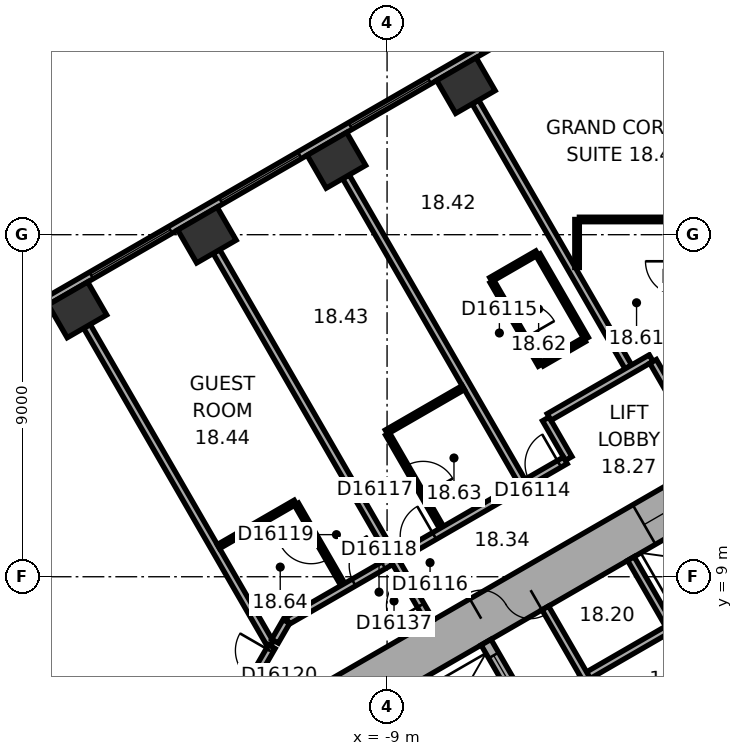
"""IFC4 building model, lengths in metres.
Left out: names, types, materials, properties, quantities, classifications, styles, units other than length and angle.
Written with IfcOpenShell. Run it as: python <this file> out.ifc"""

import sys

from ifc_helpers import new_model, si_unit, direction, frame, frame_2d, origin, origin_2d, place, context, subcontext, project, spatial, rectangle, extrude, element, fill, save


model = new_model("IFC4")
c1 = context("Model", 3, precision=1e-05, world=origin(), true_north=direction((0.0, 1.0)))
c2 = subcontext(c1, "Body", "Model", "MODEL_VIEW")
j1 = project(units=[si_unit("LENGTHUNIT", "METRE"), si_unit("PLANEANGLEUNIT", "RADIAN")], contexts=[c1])
p1 = place(None, origin())
s1 = spatial("IfcSite", under=j1, at=p1, CompositionType="ELEMENT")
p2 = place(p1, origin())
s2 = spatial("IfcBuilding", under=s1, at=p2, CompositionType="ELEMENT")
p3 = place(p2, frame((0.0, 0.0, 83.6)))
s3 = spatial("IfcBuildingStorey", under=s2, at=p3, CompositionType="ELEMENT", Elevation=83.6)
for number, where, z_axis, x_axis in (
    (1, (-6.926, 21.925, 0.0), (0.0, 0.0, 1.0), (-0.866, -0.5, 0.0)),
    (2, (-10.333, 19.957, 0.0), (0.0, 0.0, 1.0), (-0.866, -0.5, 0.0)),
    (3, (-13.74, 17.99, 0.0), (0.0, 0.0, 1.0), (-0.866, -0.5, 0.0)),
    (4, (-17.148, 16.023, 0.0), (0.0, 0.0, 1.0), (-0.866, -0.5, 0.0)),
):
    element("IfcColumn", number, at=place(p3, frame(where, z_axis=z_axis, x_axis=x_axis)), inside=s3, PredefinedType="COLUMN", context=c2, shape_type="SweptSolid", body=[
        extrude(rectangle(XDim=1.2, YDim=1.0, at=origin_2d()), origin(), (0.0, 0.0, 1.0), 3.3),
    ])
p4 = place(p3, frame((0.3, 11.836, 0.0), z_axis=(0.0, 0.0, 1.0), x_axis=(-0.866021384402, -0.500006961711, 0.0)))
e5 = element("IfcWall", 5, at=p4, inside=s3, PredefinedType="SHEAR", context=c2, shape_type="SweptSolid", body=[
    extrude(rectangle(XDim=12.355, YDim=1.2, at=frame_2d((6.178, 0.0))), origin(), (0.0, 0.0, 1.0), 3.3),
])
p5 = place(p4, frame((6.378, 0.0, 0.0)))
e6 = element("IfcOpeningElement", 6, at=p5, cuts=e5, PredefinedType="OPENING", context=c2, shape_type="SweptSolid", body=[
    extrude(rectangle(XDim=1.5, YDim=2.1, at=frame_2d((0.75, 1.05))), frame((0.0, 0.61, 0.0), z_axis=(0.0, -1.0, 0.0), x_axis=(1.0, 0.0, 0.0)), (0.0, 0.0, 1.0), 1.22),
])
p6 = place(p4, frame((1.828, 0.0, 0.0)))
e7 = element("IfcOpeningElement", 7, at=p6, cuts=e5, PredefinedType="OPENING", context=c2, shape_type="SweptSolid", body=[
    extrude(rectangle(XDim=1.1, YDim=2.1, at=frame_2d((0.55, 1.05))), frame((0.0, 0.61, 0.0), z_axis=(0.0, -1.0, 0.0), x_axis=(1.0, 0.0, 0.0)), (0.0, 0.0, 1.0), 1.22),
])
p7 = place(p3, frame((-3.136, 24.805, 0.0), z_axis=(0.0, 0.0, 1.0), x_axis=(-0.866028291626, -0.499994998079, 0.0)))
e8 = element("IfcWall", 8, at=p7, inside=s3, PredefinedType="STANDARD", context=c2, shape_type="SweptSolid", body=[
    extrude(rectangle(XDim=21.246, YDim=0.2, at=frame_2d((10.623, 0.0))), origin(), (0.0, 0.0, 1.0), 3.3),
])
p8 = place(p7, frame((1.555, 0.0, 0.8)))
e9 = element("IfcOpeningElement", 9, at=p8, cuts=e8, PredefinedType="OPENING", context=c2, shape_type="SweptSolid", body=[
    extrude(rectangle(XDim=2.4, YDim=1.7, at=frame_2d((1.2, 0.85))), frame((0.0, 0.11, 0.0), z_axis=(0.0, -1.0, 0.0), x_axis=(1.0, 0.0, 0.0)), (0.0, 0.0, 1.0), 0.22),
])
p9 = place(p7, frame((5.489, 0.0, 0.8)))
e10 = element("IfcOpeningElement", 10, at=p9, cuts=e8, PredefinedType="OPENING", context=c2, shape_type="SweptSolid", body=[
    extrude(rectangle(XDim=2.4, YDim=1.7, at=frame_2d((1.2, 0.85))), frame((0.0, 0.11, 0.0), z_axis=(0.0, -1.0, 0.0), x_axis=(1.0, 0.0, 0.0)), (0.0, 0.0, 1.0), 0.22),
])
p10 = place(p7, frame((9.424, 0.0, 0.8)))
e11 = element("IfcOpeningElement", 11, at=p10, cuts=e8, PredefinedType="OPENING", context=c2, shape_type="SweptSolid", body=[
    extrude(rectangle(XDim=2.4, YDim=1.7, at=frame_2d((1.2, 0.85))), frame((0.0, 0.11, 0.0), z_axis=(0.0, -1.0, 0.0), x_axis=(1.0, 0.0, 0.0)), (0.0, 0.0, 1.0), 0.22),
])
p11 = place(p7, frame((13.358, 0.0, 0.8)))
e12 = element("IfcOpeningElement", 12, at=p11, cuts=e8, PredefinedType="OPENING", context=c2, shape_type="SweptSolid", body=[
    extrude(rectangle(XDim=2.4, YDim=1.7, at=frame_2d((1.2, 0.85))), frame((0.0, 0.11, 0.0), z_axis=(0.0, -1.0, 0.0), x_axis=(1.0, 0.0, 0.0)), (0.0, 0.0, 1.0), 0.22),
])
p12 = place(p7, frame((17.293, 0.0, 0.8)))
e13 = element("IfcOpeningElement", 13, at=p12, cuts=e8, PredefinedType="OPENING", context=c2, shape_type="SweptSolid", body=[
    extrude(rectangle(XDim=2.4, YDim=1.7, at=frame_2d((1.2, 0.85))), frame((0.0, 0.11, 0.0), z_axis=(0.0, -1.0, 0.0), x_axis=(1.0, 0.0, 0.0)), (0.0, 0.0, 1.0), 0.22),
])
p13 = place(p3, frame((0.803, 9.009, 0.0), z_axis=(0.0, 0.0, 1.0), x_axis=(-0.866028230842, -0.499995103361, 0.0)))
e14 = element("IfcWall", 14, at=p13, inside=s3, PredefinedType="PARTITIONING", context=c2, shape_type="SweptSolid", body=[
    extrude(rectangle(XDim=5.4, YDim=0.2, at=frame_2d((2.7, 0.0))), origin(), (0.0, 0.0, 1.0), 3.05),
])
for number, where, z_axis, x_axis in (
    (15, (-1.485, 7.572, 0.0), (0.0, 0.0, 1.0), (-0.5, 0.866, 0.0)),
    (16, (-3.737, 6.272, 0.0), (0.0, 0.0, 1.0), (-0.5, 0.866, 0.0)),
):
    element("IfcWall", number, at=place(p3, frame(where, z_axis=z_axis, x_axis=x_axis)), inside=s3, PredefinedType="PARTITIONING", context=c2, shape_type="SweptSolid", body=[
        extrude(rectangle(XDim=2.2, YDim=0.2, at=frame_2d((1.1, 0.0))), origin(), (0.0, 0.0, 1.0), 3.05),
    ])
p14 = place(p3, frame((-2.216, 4.282, 0.0), z_axis=(0.0, 0.0, 1.0), x_axis=(0.499977259774, 0.866038532462, 0.0)))
e17 = element("IfcWall", 17, at=p14, inside=s3, PredefinedType="SHEAR", context=c2, shape_type="SweptSolid", body=[
    extrude(rectangle(XDim=4.7, YDim=0.3, at=frame_2d((2.35, 0.0))), origin(), (0.0, 0.0, 1.0), 3.05),
])
p15 = place(p3, frame((-5.295, 5.372, 0.0), z_axis=(0.0, 0.0, 1.0), x_axis=(-0.500077893725, 0.86598042715, 0.0)))
e18 = element("IfcWall", 18, at=p15, inside=s3, PredefinedType="SHEAR", context=c2, shape_type="SweptSolid", body=[
    extrude(rectangle(XDim=2.2, YDim=0.3, at=frame_2d((1.1, 0.0))), origin(), (0.0, 0.0, 1.0), 3.05),
])
p16 = place(p15, frame((0.7, 0.0, 0.0)))
e19 = element("IfcOpeningElement", 19, at=p16, cuts=e18, PredefinedType="OPENING", context=c2, shape_type="SweptSolid", body=[
    extrude(rectangle(XDim=1.1, YDim=2.1, at=frame_2d((0.55, 1.05))), frame((0.0, 0.16, 0.0), z_axis=(0.0, -1.0, 0.0), x_axis=(1.0, 0.0, 0.0)), (0.0, 0.0, 1.0), 0.32),
])
p17 = place(p3, frame((-16.898, 15.59, 0.0), z_axis=(0.0, 0.0, 1.0), x_axis=(0.499994742786, -0.866028439017, 0.0)))
e20 = element("IfcWall", 20, at=p17, inside=s3, PredefinedType="PARTITIONING", context=c2, shape_type="SweptSolid", body=[
    extrude(rectangle(XDim=9.65, YDim=0.2, at=frame_2d((4.825, 0.0))), origin(), (0.0, 0.0, 1.0), 3.05),
])
p18 = place(p3, frame((-13.436, 9.794, 0.0), z_axis=(0.0, 0.0, 1.0), x_axis=(0.866053246676, 0.499951771596, 0.0)))
e21 = element("IfcWall", 21, at=p18, inside=s3, PredefinedType="PARTITIONING", context=c2, shape_type="SweptSolid", body=[
    extrude(rectangle(XDim=2.335, YDim=0.12, at=frame_2d((1.167, 0.0))), origin(), (0.0, 0.0, 1.0), 3.05),
])
p19 = place(p3, frame((-12.032, 7.162, 0.0), z_axis=(0.0, 0.0, 1.0), x_axis=(-0.499951829968, -0.866053212979, 0.0)))
e22 = element("IfcWall", 22, at=p19, inside=s3, PredefinedType="PARTITIONING", context=c2, shape_type="SweptSolid", body=[
    extrude(rectangle(XDim=1.136, YDim=0.2, at=frame_2d((0.568, 0.0))), origin(), (0.0, 0.0, 1.0), 3.05),
])
p20 = place(p19, frame((0.118, 0.0, 0.0)))
e23 = element("IfcOpeningElement", 23, at=p20, cuts=e22, PredefinedType="OPENING", context=c2, shape_type="SweptSolid", body=[
    extrude(rectangle(XDim=0.9, YDim=2.1, at=frame_2d((0.45, 1.05))), frame((0.0, 0.11, 0.0), z_axis=(0.0, -1.0, 0.0), x_axis=(1.0, 0.0, 0.0)), (0.0, 0.0, 1.0), 0.22),
])
p21 = place(p3, frame((-11.65, 7.823, 0.0), z_axis=(0.0, 0.0, 1.0), x_axis=(-0.50012165622, -0.865955154139, 0.0)))
e24 = element("IfcWall", 24, at=p21, inside=s3, PredefinedType="PARTITIONING", context=c2, shape_type="SweptSolid", body=[
    extrude(rectangle(XDim=0.6, YDim=0.2, at=frame_2d((0.3, 0.0))), origin(), (0.0, 0.0, 1.0), 3.05),
])
p22 = place(p3, frame((-11.385, 10.909, 0.0), z_axis=(0.0, 0.0, 1.0), x_axis=(0.500077547548, -0.865980627057, 0.0)))
e25 = element("IfcWall", 25, at=p22, inside=s3, PredefinedType="PARTITIONING", context=c2, shape_type="SweptSolid", body=[
    extrude(rectangle(XDim=2.44, YDim=0.12, at=frame_2d((1.22, 0.0))), origin(), (0.0, 0.0, 1.0), 3.05),
])
p23 = place(p22, frame((0.77, 0.0, 0.0)))
e26 = element("IfcOpeningElement", 26, at=p23, cuts=e25, PredefinedType="OPENING", context=c2, shape_type="SweptSolid", body=[
    extrude(rectangle(XDim=0.9, YDim=2.1, at=frame_2d((0.45, 1.05))), frame((0.0, 0.07, 0.0), z_axis=(0.0, -1.0, 0.0), x_axis=(1.0, 0.0, 0.0)), (0.0, 0.0, 1.0), 0.14),
])
p24 = place(p3, frame((-10.083, 19.524, 0.0), z_axis=(0.0, 0.0, 1.0), x_axis=(0.499999662836, -0.866025598446, 0.0)))
e27 = element("IfcWall", 27, at=p24, inside=s3, PredefinedType="PARTITIONING", context=c2, shape_type="SweptSolid", body=[
    extrude(rectangle(XDim=9.25, YDim=0.2, at=frame_2d((4.625, 0.0))), origin(), (0.0, 0.0, 1.0), 2.6),
])
p25 = place(p3, frame((-9.016, 12.808, 0.0), z_axis=(0.0, 0.0, 1.0), x_axis=(0.86600796803, 0.500030198396, 0.0)))
e28 = element("IfcWall", 28, at=p25, inside=s3, PredefinedType="PARTITIONING", context=c2, shape_type="SweptSolid", body=[
    extrude(rectangle(XDim=2.335, YDim=0.12, at=frame_2d((1.167, 0.0))), origin(), (0.0, 0.0, 1.0), 3.05),
])
p26 = place(p3, frame((-8.902, 9.41, 0.0), z_axis=(0.0, 0.0, 1.0), x_axis=(-0.866014299198, -0.500019233215, 0.0)))
e29 = element("IfcWall", 29, at=p26, inside=s3, PredefinedType="PARTITIONING", context=c2, shape_type="SweptSolid", body=[
    extrude(rectangle(XDim=3.133, YDim=0.2, at=frame_2d((1.567, 0.0))), origin(), (0.0, 0.0, 1.0), 3.05),
])
p27 = place(p26, frame((0.225, 0.0, 0.0)))
e30 = element("IfcOpeningElement", 30, at=p27, cuts=e29, PredefinedType="OPENING", context=c2, shape_type="SweptSolid", body=[
    extrude(rectangle(XDim=0.9, YDim=2.1, at=frame_2d((0.45, 1.05))), frame((0.0, 0.11, 0.0), z_axis=(0.0, -1.0, 0.0), x_axis=(1.0, 0.0, 0.0)), (0.0, 0.0, 1.0), 0.22),
])
p28 = place(p3, frame((-7.865, 7.814, 0.0), z_axis=(0.0, 0.0, 1.0), x_axis=(-0.500004234368, 0.866022959057, 0.0)))
e31 = element("IfcWall", 31, at=p28, inside=s3, PredefinedType="PARTITIONING", context=c2, shape_type="SweptSolid", body=[
    extrude(rectangle(XDim=11.25, YDim=0.2, at=frame_2d((5.625, 0.0))), origin(), (0.0, 0.0, 1.0), 3.05),
])
p29 = place(p28, frame((0.5, 0.0, 0.0)))
e32 = element("IfcOpeningElement", 32, at=p29, cuts=e31, PredefinedType="OPENING", context=c2, shape_type="SweptSolid", body=[
    extrude(rectangle(XDim=0.9, YDim=2.1, at=frame_2d((0.45, 1.05))), frame((0.0, 0.11, 0.0), z_axis=(0.0, -1.0, 0.0), x_axis=(1.0, 0.0, 0.0)), (0.0, 0.0, 1.0), 0.22),
])
p30 = place(p3, frame((-7.566, 10.296, 0.0), z_axis=(0.0, 0.0, 1.0), x_axis=(-0.499985389037, 0.866033839264, 0.0)))
e33 = element("IfcWall", 33, at=p30, inside=s3, PredefinedType="PARTITIONING", context=c2, shape_type="SweptSolid", body=[
    extrude(rectangle(XDim=2.84, YDim=0.12, at=frame_2d((1.42, 0.0))), origin(), (0.0, 0.0, 1.0), 3.05),
])
p31 = place(p30, frame((0.97, 0.0, 0.0)))
e34 = element("IfcOpeningElement", 34, at=p31, cuts=e33, PredefinedType="OPENING", context=c2, shape_type="SweptSolid", body=[
    extrude(rectangle(XDim=0.9, YDim=2.1, at=frame_2d((0.45, 1.05))), frame((0.0, 0.07, 0.0), z_axis=(0.0, -1.0, 0.0), x_axis=(1.0, 0.0, 0.0)), (0.0, 0.0, 1.0), 0.14),
])
p32 = place(p3, frame((-6.676, 21.492, 0.0), z_axis=(0.0, 0.0, 1.0), x_axis=(0.500011263043, -0.866018900966, 0.0)))
e35 = element("IfcWall", 35, at=p32, inside=s3, PredefinedType="PARTITIONING", context=c2, shape_type="SweptSolid", body=[
    extrude(rectangle(XDim=8.049, YDim=0.2, at=frame_2d((4.024, 0.0))), origin(), (0.0, 0.0, 1.0), 3.05),
])
p33 = place(p3, frame((-6.268, 16.82, 0.0), z_axis=(0.0, 0.0, 1.0), x_axis=(0.866002662425, 0.500039387122, 0.0)))
e36 = element("IfcWall", 36, at=p33, inside=s3, PredefinedType="PARTITIONING", context=c2, shape_type="SweptSolid", body=[
    extrude(rectangle(XDim=1.4, YDim=0.12, at=frame_2d((0.7, 0.0))), origin(), (0.0, 0.0, 1.0), 3.05),
])
p34 = place(p3, frame((-5.026, 17.469, 0.0), z_axis=(0.0, 0.0, 1.0), x_axis=(0.500005339912, -0.866022320763, 0.0)))
e37 = element("IfcWall", 37, at=p34, inside=s3, PredefinedType="PARTITIONING", context=c2, shape_type="SweptSolid", body=[
    extrude(rectangle(XDim=2.54, YDim=0.12, at=frame_2d((1.27, 0.0))), origin(), (0.0, 0.0, 1.0), 3.05),
])
p35 = place(p3, frame((-4.968, 14.569, 0.0), z_axis=(0.0, 0.0, 1.0), x_axis=(-0.500046963369, 0.865998287773, 0.0)))
e38 = element("IfcWall", 38, at=p35, inside=s3, PredefinedType="PARTITIONING", context=c2, shape_type="SweptSolid", body=[
    extrude(rectangle(XDim=2.54, YDim=0.12, at=frame_2d((1.27, 0.0))), origin(), (0.0, 0.0, 1.0), 3.05),
])
p36 = place(p35, frame((0.82, 0.0, 0.0)))
e39 = element("IfcOpeningElement", 39, at=p36, cuts=e38, PredefinedType="OPENING", context=c2, shape_type="SweptSolid", body=[
    extrude(rectangle(XDim=0.9, YDim=2.1, at=frame_2d((0.45, 1.05))), frame((0.0, 0.07, 0.0), z_axis=(0.0, -1.0, 0.0), x_axis=(1.0, 0.0, 0.0)), (0.0, 0.0, 1.0), 0.14),
])
p37 = place(p3, frame((-4.823, 13.152, 0.0), z_axis=(0.0, 0.0, 1.0), x_axis=(0.499986357472, -0.866033280158, 0.0)))
e40 = element("IfcWall", 40, at=p37, inside=s3, PredefinedType="PARTITIONING", context=c2, shape_type="SweptSolid", body=[
    extrude(rectangle(XDim=1.201, YDim=0.2, at=frame_2d((0.601, 0.0))), origin(), (0.0, 0.0, 1.0), 3.05),
])
p38 = place(p3, frame((-4.309, 12.061, 0.0), z_axis=(0.0, 0.0, 1.0), x_axis=(-0.866020679205, -0.500008183122, 0.0)))
e41 = element("IfcWall", 41, at=p38, inside=s3, PredefinedType="PARTITIONING", context=c2, shape_type="SweptSolid", body=[
    extrude(rectangle(XDim=5.104, YDim=0.2, at=frame_2d((2.552, 0.0))), origin(), (0.0, 0.0, 1.0), 3.05),
])
p39 = place(p38, frame((0.185, 0.0, 0.0)))
e42 = element("IfcOpeningElement", 42, at=p39, cuts=e41, PredefinedType="OPENING", context=c2, shape_type="SweptSolid", body=[
    extrude(rectangle(XDim=0.9, YDim=2.1, at=frame_2d((0.45, 1.05))), frame((0.0, 0.11, 0.0), z_axis=(0.0, -1.0, 0.0), x_axis=(1.0, 0.0, 0.0)), (0.0, 0.0, 1.0), 0.22),
])
p40 = place(p38, frame((3.979, 0.0, 0.0)))
e43 = element("IfcOpeningElement", 43, at=p40, cuts=e41, PredefinedType="OPENING", context=c2, shape_type="SweptSolid", body=[
    extrude(rectangle(XDim=0.9, YDim=2.1, at=frame_2d((0.45, 1.05))), frame((0.0, 0.11, 0.0), z_axis=(0.0, -1.0, 0.0), x_axis=(1.0, 0.0, 0.0)), (0.0, 0.0, 1.0), 0.22),
])
p41 = place(p3, frame((-4.0, 17.137, 0.0), z_axis=(0.0, 0.0, 1.0), x_axis=(0.0, 1.0, 0.0)))
e44 = element("IfcWall", 44, at=p41, inside=s3, PredefinedType="PARTITIONING", context=c2, shape_type="SweptSolid", body=[
    extrude(rectangle(XDim=1.263, YDim=0.12, at=frame_2d((0.632, 0.0))), origin(), (0.0, 0.0, 1.0), 3.05),
])
p42 = place(p3, frame((-3.94, 18.401, 0.0), z_axis=(0.0, 0.0, 1.0), x_axis=(1.0, 0.0, 0.0)))
e45 = element("IfcWall", 45, at=p42, inside=s3, PredefinedType="PARTITIONING", context=c2, shape_type="SweptSolid", body=[
    extrude(rectangle(XDim=2.64, YDim=0.12, at=frame_2d((1.32, 0.0))), origin(), (0.0, 0.0, 1.0), 3.05),
])
p43 = place(p3, frame((-3.808, 15.239, 0.0), z_axis=(0.0, 0.0, 1.0), x_axis=(-0.866087136806, -0.499893060024, 0.0)))
e46 = element("IfcWall", 46, at=p43, inside=s3, PredefinedType="PARTITIONING", context=c2, shape_type="SweptSolid", body=[
    extrude(rectangle(XDim=1.28, YDim=0.12, at=frame_2d((0.64, 0.0))), origin(), (0.0, 0.0, 1.0), 3.05),
])
p44 = place(p3, frame((-2.05, 14.752, 0.0), z_axis=(0.0, 0.0, 1.0), x_axis=(-0.866030936828, -0.499990416364, 0.0)))
e47 = element("IfcWall", 47, at=p44, inside=s3, PredefinedType="PARTITIONING", context=c2, shape_type="SweptSolid", body=[
    extrude(rectangle(XDim=3.102, YDim=0.2, at=frame_2d((1.551, 0.0))), origin(), (0.0, 0.0, 1.0), 3.05),
])
p45 = place(p3, frame((-1.449, 13.712, 0.0), z_axis=(0.0, 0.0, 1.0), x_axis=(-0.499978356969, 0.866037899034, 0.0)))
e48 = element("IfcWall", 48, at=p45, inside=s3, PredefinedType="PARTITIONING", context=c2, shape_type="SweptSolid", body=[
    extrude(rectangle(XDim=1.101, YDim=0.2, at=frame_2d((0.551, 0.0))), origin(), (0.0, 0.0, 1.0), 3.05),
])
p46 = place(p3, frame((-1.3, 15.301, 0.0), z_axis=(0.0, 0.0, 1.0), x_axis=(-1.0, 0.0, 0.0)))
e49 = element("IfcWall", 49, at=p46, inside=s3, PredefinedType="PARTITIONING", context=c2, shape_type="SweptSolid", body=[
    extrude(rectangle(XDim=1.661, YDim=0.12, at=frame_2d((0.831, 0.0))), origin(), (0.0, 0.0, 1.0), 3.05),
])
p47 = place(p9, origin())
e50 = element("IfcWindow", 50, at=p47, inside=s3, PartitioningType="SINGLE_PANEL", PredefinedType="WINDOW", context=c2, shape_type="SweptSolid", body=[
    extrude(rectangle(XDim=2.4, YDim=1.7, at=frame_2d((1.2, 0.85))), frame((0.0, 0.03, 0.0), z_axis=(0.0, -1.0, 0.0), x_axis=(1.0, 0.0, 0.0)), (0.0, 0.0, 1.0), 0.06),
])
fill(e10, e50)
p48 = place(p10, origin())
e51 = element("IfcWindow", 51, at=p48, inside=s3, PartitioningType="SINGLE_PANEL", PredefinedType="WINDOW", context=c2, shape_type="SweptSolid", body=[
    extrude(rectangle(XDim=2.4, YDim=1.7, at=frame_2d((1.2, 0.85))), frame((0.0, 0.03, 0.0), z_axis=(0.0, -1.0, 0.0), x_axis=(1.0, 0.0, 0.0)), (0.0, 0.0, 1.0), 0.06),
])
fill(e11, e51)
p49 = place(p11, origin())
e52 = element("IfcWindow", 52, at=p49, inside=s3, PartitioningType="SINGLE_PANEL", PredefinedType="WINDOW", context=c2, shape_type="SweptSolid", body=[
    extrude(rectangle(XDim=2.4, YDim=1.7, at=frame_2d((1.2, 0.85))), frame((0.0, 0.03, 0.0), z_axis=(0.0, -1.0, 0.0), x_axis=(1.0, 0.0, 0.0)), (0.0, 0.0, 1.0), 0.06),
])
fill(e12, e52)
p50 = place(p5, origin())
e53 = element("IfcDoor", 53, at=p50, inside=s3, OperationType="DOUBLE_DOOR_SINGLE_SWING", PredefinedType="DOOR", context=c2, shape_type="SweptSolid", body=[
    extrude(rectangle(XDim=1.5, YDim=2.1, at=frame_2d((0.75, 1.05))), frame((0.0, 0.025, 0.0), z_axis=(0.0, -1.0, 0.0), x_axis=(1.0, 0.0, 0.0)), (0.0, 0.0, 1.0), 0.05),
])
fill(e6, e53)
p51 = place(p16, origin())
e54 = element("IfcDoor", 54, at=p51, inside=s3, OperationType="DOUBLE_DOOR_SLIDING", PredefinedType="DOOR", context=c2, shape_type="SweptSolid", body=[
    extrude(rectangle(XDim=1.1, YDim=2.1, at=frame_2d((0.55, 1.05))), frame((0.0, 0.025, 0.0), z_axis=(0.0, -1.0, 0.0), x_axis=(1.0, 0.0, 0.0)), (0.0, 0.0, 1.0), 0.05),
])
fill(e19, e54)
p52 = place(p6, origin())
e55 = element("IfcDoor", 55, at=p52, inside=s3, OperationType="DOUBLE_DOOR_SLIDING", PredefinedType="DOOR", context=c2, shape_type="SweptSolid", body=[
    extrude(rectangle(XDim=1.1, YDim=2.1, at=frame_2d((0.55, 1.05))), frame((0.0, 0.025, 0.0), z_axis=(0.0, -1.0, 0.0), x_axis=(1.0, 0.0, 0.0)), (0.0, 0.0, 1.0), 0.05),
])
fill(e7, e55)
p53 = place(p39, origin())
e56 = element("IfcDoor", 56, at=p53, inside=s3, OperationType="SINGLE_SWING_LEFT", PredefinedType="DOOR", context=c2, shape_type="SweptSolid", body=[
    extrude(rectangle(XDim=0.9, YDim=2.1, at=frame_2d((0.45, 1.05))), frame((0.0, 0.025, 0.0), z_axis=(0.0, -1.0, 0.0), x_axis=(1.0, 0.0, 0.0)), (0.0, 0.0, 1.0), 0.05),
])
fill(e42, e56)
p54 = place(p36, origin())
e57 = element("IfcDoor", 57, at=p54, inside=s3, OperationType="SINGLE_SWING_LEFT", PredefinedType="DOOR", context=c2, shape_type="SweptSolid", body=[
    extrude(rectangle(XDim=0.9, YDim=2.1, at=frame_2d((0.45, 1.05))), frame((0.0, 0.025, 0.0), z_axis=(0.0, -1.0, 0.0), x_axis=(1.0, 0.0, 0.0)), (0.0, 0.0, 1.0), 0.05),
])
fill(e39, e57)
p55 = place(p40, origin())
e58 = element("IfcDoor", 58, at=p55, inside=s3, OperationType="SINGLE_SWING_LEFT", PredefinedType="DOOR", context=c2, shape_type="SweptSolid", body=[
    extrude(rectangle(XDim=0.9, YDim=2.1, at=frame_2d((0.45, 1.05))), frame((0.0, 0.025, 0.0), z_axis=(0.0, -1.0, 0.0), x_axis=(1.0, 0.0, 0.0)), (0.0, 0.0, 1.0), 0.05),
])
fill(e43, e58)
p56 = place(p31, origin())
e59 = element("IfcDoor", 59, at=p56, inside=s3, OperationType="SINGLE_SWING_LEFT", PredefinedType="DOOR", context=c2, shape_type="SweptSolid", body=[
    extrude(rectangle(XDim=0.9, YDim=2.1, at=frame_2d((0.45, 1.05))), frame((0.0, 0.025, 0.0), z_axis=(0.0, -1.0, 0.0), x_axis=(1.0, 0.0, 0.0)), (0.0, 0.0, 1.0), 0.05),
])
fill(e34, e59)
p57 = place(p27, origin())
e60 = element("IfcDoor", 60, at=p57, inside=s3, OperationType="SINGLE_SWING_LEFT", PredefinedType="DOOR", context=c2, shape_type="SweptSolid", body=[
    extrude(rectangle(XDim=0.9, YDim=2.1, at=frame_2d((0.45, 1.05))), frame((0.0, 0.025, 0.0), z_axis=(0.0, -1.0, 0.0), x_axis=(1.0, 0.0, 0.0)), (0.0, 0.0, 1.0), 0.05),
])
fill(e30, e60)
p58 = place(p23, origin())
e61 = element("IfcDoor", 61, at=p58, inside=s3, OperationType="SINGLE_SWING_LEFT", PredefinedType="DOOR", context=c2, shape_type="SweptSolid", body=[
    extrude(rectangle(XDim=0.9, YDim=2.1, at=frame_2d((0.45, 1.05))), frame((0.0, 0.025, 0.0), z_axis=(0.0, -1.0, 0.0), x_axis=(1.0, 0.0, 0.0)), (0.0, 0.0, 1.0), 0.05),
])
fill(e26, e61)
p59 = place(p20, origin())
e62 = element("IfcDoor", 62, at=p59, inside=s3, OperationType="SINGLE_SWING_LEFT", PredefinedType="DOOR", context=c2, shape_type="SweptSolid", body=[
    extrude(rectangle(XDim=0.9, YDim=2.1, at=frame_2d((0.45, 1.05))), frame((0.0, 0.025, 0.0), z_axis=(0.0, -1.0, 0.0), x_axis=(1.0, 0.0, 0.0)), (0.0, 0.0, 1.0), 0.05),
])
fill(e23, e62)
p60 = place(p29, origin())
e63 = element("IfcDoor", 63, at=p60, inside=s3, OperationType="SINGLE_SWING_LEFT", PredefinedType="DOOR", context=c2, shape_type="SweptSolid", body=[
    extrude(rectangle(XDim=0.9, YDim=2.1, at=frame_2d((0.45, 1.05))), frame((0.0, 0.025, 0.0), z_axis=(0.0, -1.0, 0.0), x_axis=(1.0, 0.0, 0.0)), (0.0, 0.0, 1.0), 0.05),
])
fill(e32, e63)
save(model, sys.argv[1])
